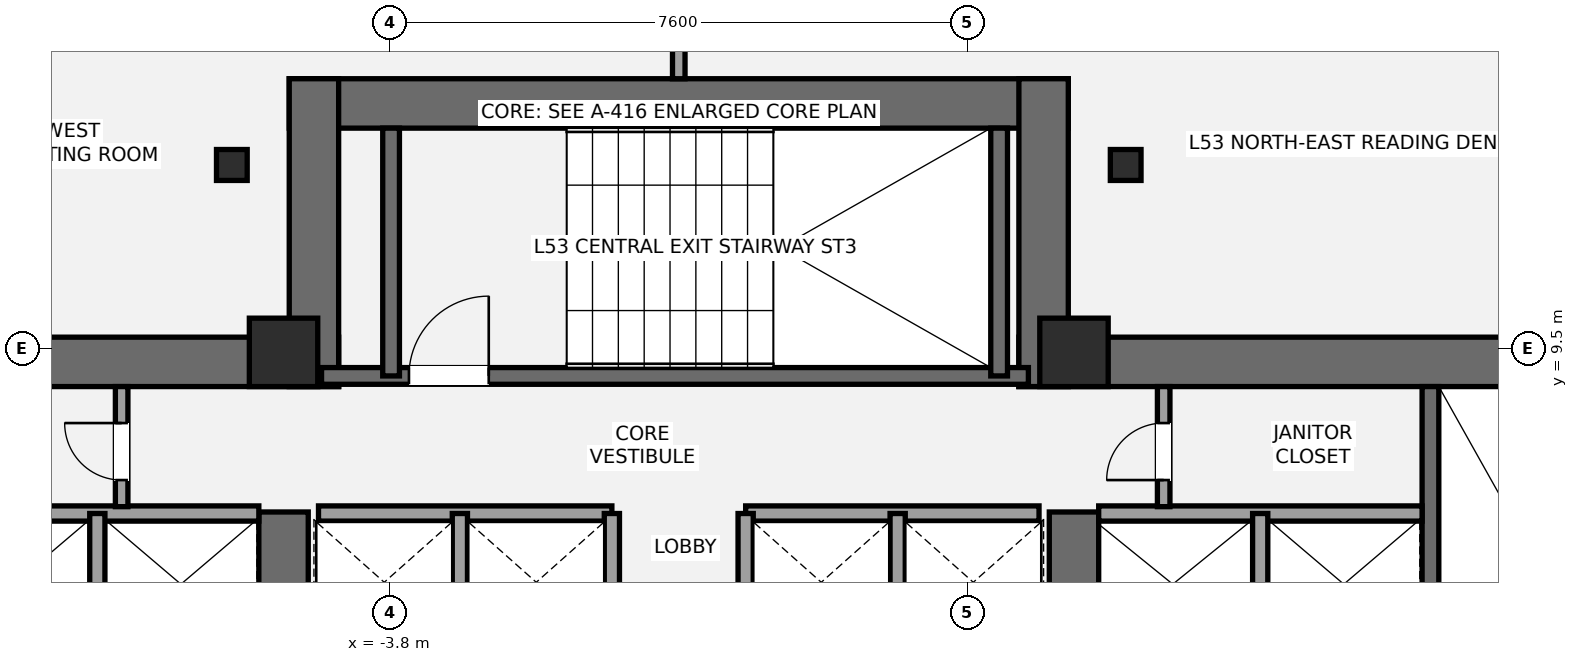
"""IFC4 building model, lengths in metres.
Left out: names, types, materials, properties, quantities, classifications, styles, units other than length and angle.
Written with IfcOpenShell. Run it as: python <this file> out.ifc"""

import sys

from ifc_helpers import new_model, si_unit, direction, frame, frame_2d, origin, origin_2d, place, context, subcontext, project, spatial, rectangle, i_section, extrude, element, fill, save


model = new_model("IFC4")
c1 = context("Model", 3, precision=1e-05, world=origin(), true_north=direction((0.0, 1.0)))
c2 = subcontext(c1, "Body", "Model", "MODEL_VIEW")
j1 = project(units=[si_unit("LENGTHUNIT", "METRE"), si_unit("PLANEANGLEUNIT", "RADIAN")], contexts=[c1])
p1 = place(None, origin())
s1 = spatial("IfcSite", under=j1, at=p1, CompositionType="ELEMENT")
p2 = place(p1, origin())
s2 = spatial("IfcBuilding", under=s1, at=p2, CompositionType="ELEMENT")
p3 = place(p2, frame((0.0, 0.0, 191.8)))
s3 = spatial("IfcBuildingStorey", under=s2, at=p3, CompositionType="ELEMENT", Elevation=191.8)
p4 = place(p3, frame((-13.8, 9.325, 0.0), z_axis=(0.0, 0.0, 1.0), x_axis=(1.0, 0.0, 0.0)))
e1 = element("IfcWall", 1, at=p4, inside=s3, PredefinedType="SHEAR", context=c2, shape_type="SweptSolid", body=[
    extrude(rectangle(XDim=9.325, YDim=0.65, at=frame_2d((4.663, 0.0))), origin(), (0.0, 0.0, 1.0), 3.2),
])
p5 = place(p3, frame((-5.2, 5.35, 0.0), z_axis=(0.0, 0.0, 1.0), x_axis=(0.0, 1.0, 0.0)))
e2 = element("IfcWall", 2, at=p5, inside=s3, PredefinedType="SHEAR", context=c2, shape_type="SweptSolid", body=[
    extrude(rectangle(XDim=2.0, YDim=0.65, at=frame_2d((1.0, 0.0))), origin(), (0.0, 0.0, 1.0), 3.2),
])
p6 = place(p3, frame((4.475, 9.325, 0.0), z_axis=(0.0, 0.0, 1.0), x_axis=(1.0, 0.0, 0.0)))
e3 = element("IfcWall", 3, at=p6, inside=s3, PredefinedType="SHEAR", context=c2, shape_type="SweptSolid", body=[
    extrude(rectangle(XDim=9.325, YDim=0.65, at=frame_2d((4.663, 0.0))), origin(), (0.0, 0.0, 1.0), 3.2),
])
p7 = place(p3, frame((5.2, 5.35, 0.0), z_axis=(0.0, 0.0, 1.0), x_axis=(0.0, 1.0, 0.0)))
e4 = element("IfcWall", 4, at=p7, inside=s3, PredefinedType="SHEAR", context=c2, shape_type="SweptSolid", body=[
    extrude(rectangle(XDim=2.0, YDim=0.65, at=frame_2d((1.0, 0.0))), origin(), (0.0, 0.0, 1.0), 3.2),
])
p8 = place(p3, frame((9.89, 1.85, 0.0), z_axis=(0.0, 0.0, 1.0), x_axis=(0.0, 1.0, 0.0)))
e5 = element("IfcWall", 5, at=p8, inside=s3, PredefinedType="SHEAR", context=c2, shape_type="SweptSolid", body=[
    extrude(rectangle(XDim=7.15, YDim=0.22, at=frame_2d((3.575, 0.0))), origin(), (0.0, 0.0, 1.0), 3.2),
])
p9 = place(p3, frame((-5.125, 12.725, 0.0), z_axis=(0.0, 0.0, 1.0), x_axis=(1.0, 0.0, 0.0)))
e6 = element("IfcWall", 6, at=p9, inside=s3, PredefinedType="SHEAR", context=c2, shape_type="SweptSolid", body=[
    extrude(rectangle(XDim=10.25, YDim=0.65, at=frame_2d((5.125, 0.0))), origin(), (0.0, 0.0, 1.0), 3.2),
])
for number, where, z_axis, x_axis in (
    (7, (-4.8, 9.0, 0.0), (0.0, 0.0, 1.0), (0.0, 1.0, 0.0)),
    (8, (4.8, 9.0, 0.0), (0.0, 0.0, 1.0), (0.0, 1.0, 0.0)),
):
    element("IfcWall", number, at=place(p3, frame(where, z_axis=z_axis, x_axis=x_axis)), inside=s3, PredefinedType="SHEAR", context=c2, shape_type="SweptSolid", body=[
        extrude(rectangle(XDim=4.05, YDim=0.65, at=frame_2d((2.025, 0.0))), origin(), (0.0, 0.0, 1.0), 3.2),
    ])
p10 = place(p3, frame((-4.7, 9.14, 0.0), z_axis=(0.0, 0.0, 1.0), x_axis=(1.0, 0.0, 0.0)))
e9 = element("IfcWall", 9, at=p10, inside=s3, PredefinedType="SHEAR", context=c2, shape_type="SweptSolid", body=[
    extrude(rectangle(XDim=9.3, YDim=0.22, at=frame_2d((4.65, 0.0))), origin(), (0.0, 0.0, 1.0), 3.2),
])
p11 = place(p10, frame((1.15, 0.0, 0.0)))
e10 = element("IfcOpeningElement", 10, at=p11, cuts=e9, PredefinedType="OPENING", context=c2, shape_type="SweptSolid", body=[
    extrude(rectangle(XDim=1.05, YDim=2.15, at=frame_2d((0.525, 1.075))), frame((0.0, 0.12, 0.0), z_axis=(0.0, -1.0, 0.0), x_axis=(1.0, 0.0, 0.0)), (0.0, 0.0, 1.0), 0.24),
])
for number, where, z_axis, x_axis in (
    (11, (-3.785, 9.14, 0.0), (0.0, 0.0, 1.0), (0.0, 1.0, 0.0)),
    (12, (4.215, 9.14, 0.0), (0.0, 0.0, 1.0), (0.0, 1.0, 0.0)),
):
    element("IfcWall", number, at=place(p3, frame(where, z_axis=z_axis, x_axis=x_axis)), inside=s3, PredefinedType="SHEAR", context=c2, shape_type="SweptSolid", body=[
        extrude(rectangle(XDim=3.26, YDim=0.22, at=frame_2d((1.63, 0.0))), origin(), (0.0, 0.0, 1.0), 3.2),
    ])
for number, where, z_axis, x_axis in (
    (13, (-5.2, 9.45, 0.0), (0.0, 0.0, 1.0), (1.0, 0.0, 0.0)),
    (14, (5.2, 9.45, 0.0), (0.0, 0.0, 1.0), (1.0, 0.0, 0.0)),
):
    element("IfcColumn", number, at=place(p3, frame(where, z_axis=z_axis, x_axis=x_axis)), inside=s3, PredefinedType="COLUMN", context=c2, shape_type="SweptSolid", body=[
        extrude(rectangle(XDim=0.9, YDim=0.9, at=origin_2d()), origin(), (0.0, 0.0, 1.0), 3.2),
    ])
for number, where, z_axis, x_axis in (
    (15, (5.88, 11.915, 0.0), (0.0, 0.0, 1.0), (1.0, 0.0, 0.0)),
    (16, (-5.88, 11.915, 0.0), (0.0, 0.0, 1.0), (1.0, 0.0, 0.0)),
):
    element("IfcColumn", number, at=place(p3, frame(where, z_axis=z_axis, x_axis=x_axis)), inside=s3, PredefinedType="COLUMN", context=c2, shape_type="SweptSolid", body=[
        extrude(i_section(OverallWidth=0.404, OverallDepth=0.407, WebThickness=0.027, FlangeThickness=0.044, at=origin_2d()), origin(), (0.0, 0.0, 1.0), 3.2),
    ])
p12 = place(p3, frame((-9.78, 7.33, 0.0), z_axis=(0.0, 0.0, 1.0), x_axis=(1.0, 0.0, 0.0)))
e17 = element("IfcWall", 17, at=p12, inside=s3, PredefinedType="SOLIDWALL", context=c2, shape_type="SweptSolid", body=[
    extrude(rectangle(XDim=4.255, YDim=0.2, at=frame_2d((2.127, 0.0))), origin(), (0.0, 0.0, 1.0), 3.02),
])
p13 = place(p3, frame((-7.65, 5.47, 0.0), z_axis=(0.0, 0.0, 1.0), x_axis=(0.0, 1.0, 0.0)))
e18 = element("IfcWall", 18, at=p13, inside=s3, PredefinedType="SOLIDWALL", context=c2, shape_type="SweptSolid", body=[
    extrude(rectangle(XDim=1.86, YDim=0.2, at=frame_2d((0.93, 0.0))), origin(), (0.0, 0.0, 1.0), 3.02),
])
p14 = place(p3, frame((5.525, 7.33, 0.0), z_axis=(0.0, 0.0, 1.0), x_axis=(1.0, 0.0, 0.0)))
e19 = element("IfcWall", 19, at=p14, inside=s3, PredefinedType="SOLIDWALL", context=c2, shape_type="SweptSolid", body=[
    extrude(rectangle(XDim=4.255, YDim=0.2, at=frame_2d((2.127, 0.0))), origin(), (0.0, 0.0, 1.0), 3.02),
])
p15 = place(p3, frame((7.65, 5.47, 0.0), z_axis=(0.0, 0.0, 1.0), x_axis=(0.0, 1.0, 0.0)))
e20 = element("IfcWall", 20, at=p15, inside=s3, PredefinedType="SOLIDWALL", context=c2, shape_type="SweptSolid", body=[
    extrude(rectangle(XDim=1.86, YDim=0.2, at=frame_2d((0.93, 0.0))), origin(), (0.0, 0.0, 1.0), 3.02),
])
for number, where, z_axis, x_axis in (
    (21, (-4.74, 7.33, 0.0), (0.0, 0.0, 1.0), (1.0, 0.0, 0.0)),
    (22, (0.88, 7.33, 0.0), (0.0, 0.0, 1.0), (1.0, 0.0, 0.0)),
):
    element("IfcWall", number, at=place(p3, frame(where, z_axis=z_axis, x_axis=x_axis)), inside=s3, PredefinedType="SOLIDWALL", context=c2, shape_type="SweptSolid", body=[
        extrude(rectangle(XDim=3.86, YDim=0.2, at=frame_2d((1.93, 0.0))), origin(), (0.0, 0.0, 1.0), 3.02),
    ])
for number, where, z_axis, x_axis in (
    (23, (-2.88, 5.52, 0.0), (0.0, 0.0, 1.0), (0.0, 1.0, 0.0)),
    (24, (2.88, 5.52, 0.0), (0.0, 0.0, 1.0), (0.0, 1.0, 0.0)),
    (25, (-0.88, 5.52, 0.0), (0.0, 0.0, 1.0), (0.0, 1.0, 0.0)),
    (26, (0.88, 5.52, 0.0), (0.0, 0.0, 1.0), (0.0, 1.0, 0.0)),
):
    element("IfcWall", number, at=place(p3, frame(where, z_axis=z_axis, x_axis=x_axis)), inside=s3, PredefinedType="SOLIDWALL", context=c2, shape_type="SweptSolid", body=[
        extrude(rectangle(XDim=1.81, YDim=0.2, at=frame_2d((0.905, 0.0))), origin(), (0.0, 0.0, 1.0), 3.02),
    ])
p16 = place(p3, frame((-7.33, 7.42, 0.0), z_axis=(0.0, 0.0, 1.0), x_axis=(0.0, 1.0, 0.0)))
e27 = element("IfcWall", 27, at=p16, inside=s3, PredefinedType="PARTITIONING", context=c2, shape_type="SweptSolid", body=[
    extrude(rectangle(XDim=1.58, YDim=0.165, at=frame_2d((0.79, 0.0))), origin(), (0.0, 0.0, 1.0), 3.02),
])
p17 = place(p16, frame((0.35, 0.0, 0.0)))
e28 = element("IfcOpeningElement", 28, at=p17, cuts=e27, PredefinedType="OPENING", context=c2, shape_type="SweptSolid", body=[
    extrude(rectangle(XDim=0.75, YDim=2.1, at=frame_2d((0.375, 1.05))), frame((0.0, 0.093, 0.0), z_axis=(0.0, -1.0, 0.0), x_axis=(1.0, 0.0, 0.0)), (0.0, 0.0, 1.0), 0.185),
])
p18 = place(p3, frame((6.38, 7.42, 0.0), z_axis=(0.0, 0.0, 1.0), x_axis=(0.0, 1.0, 0.0)))
e29 = element("IfcWall", 29, at=p18, inside=s3, PredefinedType="PARTITIONING", context=c2, shape_type="SweptSolid", body=[
    extrude(rectangle(XDim=1.58, YDim=0.165, at=frame_2d((0.79, 0.0))), origin(), (0.0, 0.0, 1.0), 3.02),
])
p19 = place(p18, frame((0.35, 0.0, 0.0)))
e30 = element("IfcOpeningElement", 30, at=p19, cuts=e29, PredefinedType="OPENING", context=c2, shape_type="SweptSolid", body=[
    extrude(rectangle(XDim=0.75, YDim=2.1, at=frame_2d((0.375, 1.05))), frame((0.0, 0.093, 0.0), z_axis=(0.0, -1.0, 0.0), x_axis=(1.0, 0.0, 0.0)), (0.0, 0.0, 1.0), 0.185),
])
p20 = place(p3, frame((0.0, 13.05, 0.0), z_axis=(0.0, 0.0, 1.0), x_axis=(0.0, 1.0, 0.0)))
e31 = element("IfcWall", 31, at=p20, inside=s3, PredefinedType="PARTITIONING", context=c2, shape_type="SweptSolid", body=[
    extrude(rectangle(XDim=3.04, YDim=0.165, at=frame_2d((1.52, 0.0))), origin(), (0.0, 0.0, 1.0), 3.02),
])
p21 = place(p11, origin())
e32 = element("IfcDoor", 32, at=p21, inside=s3, OperationType="SINGLE_SWING_RIGHT", PredefinedType="DOOR", context=c2, shape_type="SweptSolid", body=[
    extrude(rectangle(XDim=1.05, YDim=2.15, at=frame_2d((0.525, 1.075))), frame((0.0, 0.025, 0.0), z_axis=(0.0, -1.0, 0.0), x_axis=(1.0, 0.0, 0.0)), (0.0, 0.0, 1.0), 0.05),
])
fill(e10, e32)
p22 = place(p17, origin())
e33 = element("IfcDoor", 33, at=p22, inside=s3, OperationType="SINGLE_SWING_RIGHT", PredefinedType="DOOR", context=c2, shape_type="SweptSolid", body=[
    extrude(rectangle(XDim=0.75, YDim=2.1, at=frame_2d((0.375, 1.05))), frame((0.0, 0.025, 0.0), z_axis=(0.0, -1.0, 0.0), x_axis=(1.0, 0.0, 0.0)), (0.0, 0.0, 1.0), 0.05),
])
fill(e28, e33)
p23 = place(p19, origin())
e34 = element("IfcDoor", 34, at=p23, inside=s3, OperationType="SINGLE_SWING_LEFT", PredefinedType="DOOR", context=c2, shape_type="SweptSolid", body=[
    extrude(rectangle(XDim=0.75, YDim=2.1, at=frame_2d((0.375, 1.05))), frame((0.0, 0.025, 0.0), z_axis=(0.0, -1.0, 0.0), x_axis=(1.0, 0.0, 0.0)), (0.0, 0.0, 1.0), 0.05),
])
fill(e30, e34)
save(model, sys.argv[1])
